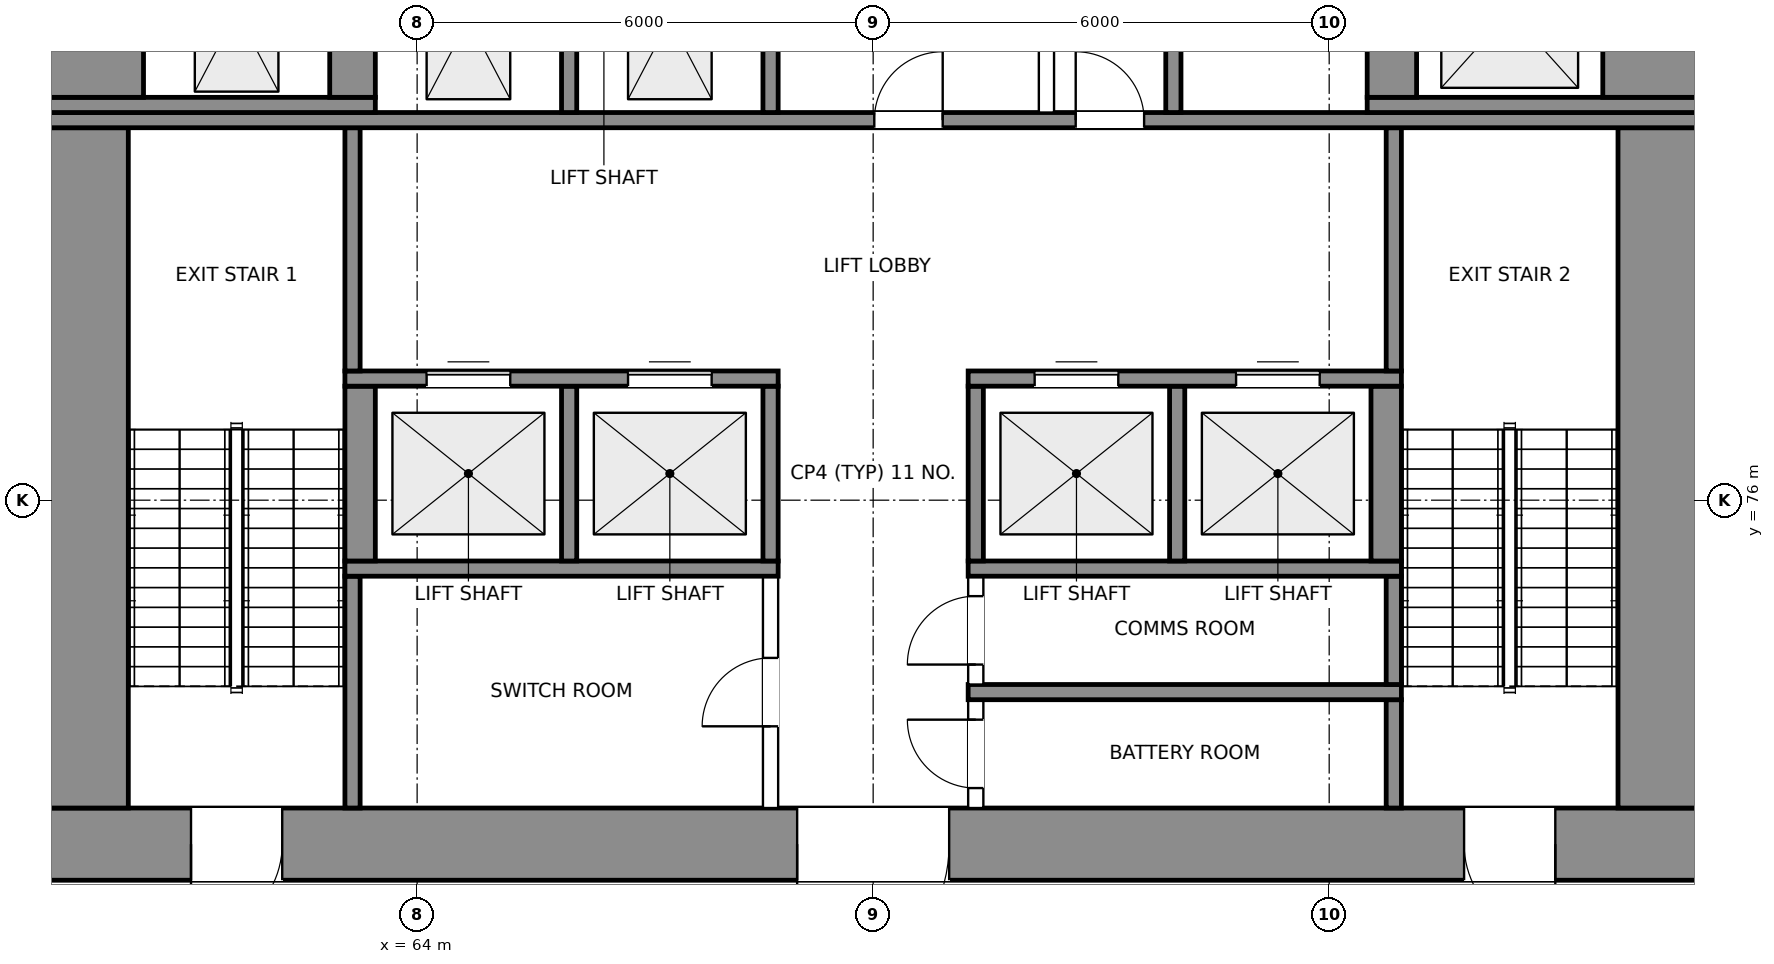
"""IFC4 building model, lengths in metres.
Left out: names, types, materials, properties, quantities, classifications, styles, units other than length and angle.
Written with IfcOpenShell. Run it as: python <this file> out.ifc"""

import sys

from ifc_helpers import new_model, si_unit, direction, frame, frame_2d, origin, place, context, subcontext, project, spatial, rectangle, extrude, element, fill, save


model = new_model("IFC4")
c1 = context("Model", 3, precision=1e-05, world=origin(), true_north=direction((0.0, 1.0)))
c2 = subcontext(c1, "Body", "Model", "MODEL_VIEW")
j1 = project(units=[si_unit("LENGTHUNIT", "METRE"), si_unit("PLANEANGLEUNIT", "RADIAN")], contexts=[c1])
p1 = place(None, origin())
s1 = spatial("IfcSite", under=j1, at=p1, CompositionType="ELEMENT")
p2 = place(p1, origin())
s2 = spatial("IfcBuilding", under=s1, at=p2, CompositionType="ELEMENT")
p3 = place(p2, frame((0.0, 0.0, 191.5)))
s3 = spatial("IfcBuildingStorey", under=s2, at=p3, CompositionType="ELEMENT", Elevation=191.5)
p4 = place(p3, frame((59.0, 71.475, 0.0), z_axis=(0.0, 0.0, 1.0), x_axis=(1.0, 0.0, 0.0)))
e1 = element("IfcWall", 1, at=p4, inside=s3, PredefinedType="SHEAR", context=c2, shape_type="SweptSolid", body=[
    extrude(rectangle(XDim=22.0, YDim=0.95, at=frame_2d((11.0, 0.0))), origin(), (0.0, 0.0, 1.0), 5.0),
])
p5 = place(p4, frame((2.025, 0.0, 0.0)))
e2 = element("IfcOpeningElement", 2, at=p5, cuts=e1, PredefinedType="OPENING", context=c2, shape_type="SweptSolid", body=[
    extrude(rectangle(XDim=1.2, YDim=2.1, at=frame_2d((0.6, 1.05))), frame((0.0, 0.485, 0.0), z_axis=(0.0, -1.0, 0.0), x_axis=(1.0, 0.0, 0.0)), (0.0, 0.0, 1.0), 0.97),
])
p6 = place(p4, frame((18.775, 0.0, 0.0)))
e3 = element("IfcOpeningElement", 3, at=p6, cuts=e1, PredefinedType="OPENING", context=c2, shape_type="SweptSolid", body=[
    extrude(rectangle(XDim=1.2, YDim=2.1, at=frame_2d((0.6, 1.05))), frame((0.0, 0.485, 0.0), z_axis=(0.0, -1.0, 0.0), x_axis=(1.0, 0.0, 0.0)), (0.0, 0.0, 1.0), 0.97),
])
p7 = place(p4, frame((10.0, 0.0, 0.0)))
e4 = element("IfcOpeningElement", 4, at=p7, cuts=e1, PredefinedType="OPENING", context=c2, shape_type="SweptSolid", body=[
    extrude(rectangle(XDim=2.0, YDim=2.1, at=frame_2d((1.0, 1.05))), frame((0.0, 0.485, 0.0), z_axis=(0.0, -1.0, 0.0), x_axis=(1.0, 0.0, 0.0)), (0.0, 0.0, 1.0), 0.97),
])
p8 = place(p3, frame((59.6, 71.95, 0.0), z_axis=(0.0, 0.0, 1.0), x_axis=(0.0, 1.0, 0.0)))
e5 = element("IfcWall", 5, at=p8, inside=s3, PredefinedType="SHEAR", context=c2, shape_type="SweptSolid", body=[
    extrude(rectangle(XDim=8.95, YDim=1.2, at=frame_2d((4.475, 0.0))), origin(), (0.0, 0.0, 1.0), 5.0),
])
p9 = place(p3, frame((63.15, 71.95, 0.0), z_axis=(0.0, 0.0, 1.0), x_axis=(0.0, 1.0, 0.0)))
e6 = element("IfcWall", 6, at=p9, inside=s3, PredefinedType="SHEAR", context=c2, shape_type="SweptSolid", body=[
    extrude(rectangle(XDim=3.05, YDim=0.2, at=frame_2d((1.525, 0.0))), origin(), (0.0, 0.0, 1.0), 5.0),
])
p10 = place(p3, frame((68.65, 71.95, 0.0), z_axis=(0.0, 0.0, 1.0), x_axis=(0.0, 1.0, 0.0)))
e7 = element("IfcWall", 7, at=p10, inside=s3, PredefinedType="PARTITIONING", context=c2, shape_type="SweptSolid", body=[
    extrude(rectangle(XDim=3.05, YDim=0.2, at=frame_2d((1.525, 0.0))), origin(), (0.0, 0.0, 1.0), 4.7),
])
p11 = place(p10, frame((1.075, 0.0, 0.0)))
e8 = element("IfcOpeningElement", 8, at=p11, cuts=e7, PredefinedType="OPENING", context=c2, shape_type="SweptSolid", body=[
    extrude(rectangle(XDim=0.9, YDim=2.1, at=frame_2d((0.45, 1.05))), frame((0.0, 0.11, 0.0), z_axis=(0.0, -1.0, 0.0), x_axis=(1.0, 0.0, 0.0)), (0.0, 0.0, 1.0), 0.22),
])
p12 = place(p3, frame((71.35, 71.95, 0.0), z_axis=(0.0, 0.0, 1.0), x_axis=(0.0, 1.0, 0.0)))
e9 = element("IfcWall", 9, at=p12, inside=s3, PredefinedType="PARTITIONING", context=c2, shape_type="SweptSolid", body=[
    extrude(rectangle(XDim=1.425, YDim=0.2, at=frame_2d((0.712, 0.0))), origin(), (0.0, 0.0, 1.0), 4.7),
])
p13 = place(p12, frame((0.262, 0.0, 0.0)))
e10 = element("IfcOpeningElement", 10, at=p13, cuts=e9, PredefinedType="OPENING", context=c2, shape_type="SweptSolid", body=[
    extrude(rectangle(XDim=0.9, YDim=2.1, at=frame_2d((0.45, 1.05))), frame((0.0, 0.11, 0.0), z_axis=(0.0, -1.0, 0.0), x_axis=(1.0, 0.0, 0.0)), (0.0, 0.0, 1.0), 0.22),
])
p14 = place(p3, frame((76.85, 71.95, 0.0), z_axis=(0.0, 0.0, 1.0), x_axis=(0.0, 1.0, 0.0)))
e11 = element("IfcWall", 11, at=p14, inside=s3, PredefinedType="SHEAR", context=c2, shape_type="SweptSolid", body=[
    extrude(rectangle(XDim=1.425, YDim=0.2, at=frame_2d((0.712, 0.0))), origin(), (0.0, 0.0, 1.0), 5.0),
])
p15 = place(p3, frame((80.4, 71.95, 0.0), z_axis=(0.0, 0.0, 1.0), x_axis=(0.0, 1.0, 0.0)))
e12 = element("IfcWall", 12, at=p15, inside=s3, PredefinedType="SHEAR", context=c2, shape_type="SweptSolid", body=[
    extrude(rectangle(XDim=8.95, YDim=1.2, at=frame_2d((4.475, 0.0))), origin(), (0.0, 0.0, 1.0), 5.0),
])
p16 = place(p3, frame((71.25, 73.475, 0.0), z_axis=(0.0, 0.0, 1.0), x_axis=(1.0, 0.0, 0.0)))
e13 = element("IfcWall", 13, at=p16, inside=s3, PredefinedType="SHEAR", context=c2, shape_type="SweptSolid", body=[
    extrude(rectangle(XDim=5.7, YDim=0.2, at=frame_2d((2.85, 0.0))), origin(), (0.0, 0.0, 1.0), 5.0),
])
p17 = place(p3, frame((71.35, 73.575, 0.0), z_axis=(0.0, 0.0, 1.0), x_axis=(0.0, 1.0, 0.0)))
e14 = element("IfcWall", 14, at=p17, inside=s3, PredefinedType="PARTITIONING", context=c2, shape_type="SweptSolid", body=[
    extrude(rectangle(XDim=1.425, YDim=0.2, at=frame_2d((0.712, 0.0))), origin(), (0.0, 0.0, 1.0), 4.7),
])
p18 = place(p17, frame((0.262, 0.0, 0.0)))
e15 = element("IfcOpeningElement", 15, at=p18, cuts=e14, PredefinedType="OPENING", context=c2, shape_type="SweptSolid", body=[
    extrude(rectangle(XDim=0.9, YDim=2.1, at=frame_2d((0.45, 1.05))), frame((0.0, 0.11, 0.0), z_axis=(0.0, -1.0, 0.0), x_axis=(1.0, 0.0, 0.0)), (0.0, 0.0, 1.0), 0.22),
])
p19 = place(p3, frame((76.85, 73.575, 0.0), z_axis=(0.0, 0.0, 1.0), x_axis=(0.0, 1.0, 0.0)))
e16 = element("IfcWall", 16, at=p19, inside=s3, PredefinedType="SHEAR", context=c2, shape_type="SweptSolid", body=[
    extrude(rectangle(XDim=1.425, YDim=0.2, at=frame_2d((0.712, 0.0))), origin(), (0.0, 0.0, 1.0), 5.0),
])
for number, where, z_axis, x_axis in (
    (17, (63.05, 75.1, 0.0), (0.0, 0.0, 1.0), (1.0, 0.0, 0.0)),
    (18, (71.25, 75.1, 0.0), (0.0, 0.0, 1.0), (1.0, 0.0, 0.0)),
):
    element("IfcWall", number, at=place(p3, frame(where, z_axis=z_axis, x_axis=x_axis)), inside=s3, PredefinedType="SHEAR", context=c2, shape_type="SweptSolid", body=[
        extrude(rectangle(XDim=5.7, YDim=0.2, at=frame_2d((2.85, 0.0))), origin(), (0.0, 0.0, 1.0), 5.0),
    ])
p20 = place(p3, frame((63.25, 75.2, 0.0), z_axis=(0.0, 0.0, 1.0), x_axis=(0.0, 1.0, 0.0)))
e19 = element("IfcWall", 19, at=p20, inside=s3, PredefinedType="SHEAR", context=c2, shape_type="SweptSolid", body=[
    extrude(rectangle(XDim=2.3, YDim=0.4, at=frame_2d((1.15, 0.0))), origin(), (0.0, 0.0, 1.0), 5.0),
])
for number, where, z_axis, x_axis in (
    (20, (66.0, 75.2, 0.0), (0.0, 0.0, 1.0), (0.0, 1.0, 0.0)),
    (21, (68.65, 75.2, 0.0), (0.0, 0.0, 1.0), (0.0, 1.0, 0.0)),
    (22, (71.35, 75.2, 0.0), (0.0, 0.0, 1.0), (0.0, 1.0, 0.0)),
    (23, (74.0, 75.2, 0.0), (0.0, 0.0, 1.0), (0.0, 1.0, 0.0)),
):
    element("IfcWall", number, at=place(p3, frame(where, z_axis=z_axis, x_axis=x_axis)), inside=s3, PredefinedType="SHEAR", context=c2, shape_type="SweptSolid", body=[
        extrude(rectangle(XDim=2.3, YDim=0.2, at=frame_2d((1.15, 0.0))), origin(), (0.0, 0.0, 1.0), 5.0),
    ])
p21 = place(p3, frame((76.75, 75.2, 0.0), z_axis=(0.0, 0.0, 1.0), x_axis=(0.0, 1.0, 0.0)))
e24 = element("IfcWall", 24, at=p21, inside=s3, PredefinedType="SHEAR", context=c2, shape_type="SweptSolid", body=[
    extrude(rectangle(XDim=2.3, YDim=0.4, at=frame_2d((1.15, 0.0))), origin(), (0.0, 0.0, 1.0), 5.0),
])
p22 = place(p3, frame((63.05, 77.6, 0.0), z_axis=(0.0, 0.0, 1.0), x_axis=(1.0, 0.0, 0.0)))
e25 = element("IfcWall", 25, at=p22, inside=s3, PredefinedType="SHEAR", context=c2, shape_type="SweptSolid", body=[
    extrude(rectangle(XDim=5.7, YDim=0.2, at=frame_2d((2.85, 0.0))), origin(), (0.0, 0.0, 1.0), 5.0),
])
p23 = place(p22, frame((1.075, 0.0, 0.0)))
e26 = element("IfcOpeningElement", 26, at=p23, cuts=e25, PredefinedType="OPENING", context=c2, shape_type="SweptSolid", body=[
    extrude(rectangle(XDim=1.1, YDim=2.1, at=frame_2d((0.55, 1.05))), frame((0.0, 0.11, 0.0), z_axis=(0.0, -1.0, 0.0), x_axis=(1.0, 0.0, 0.0)), (0.0, 0.0, 1.0), 0.22),
])
p24 = place(p22, frame((3.725, 0.0, 0.0)))
e27 = element("IfcOpeningElement", 27, at=p24, cuts=e25, PredefinedType="OPENING", context=c2, shape_type="SweptSolid", body=[
    extrude(rectangle(XDim=1.1, YDim=2.1, at=frame_2d((0.55, 1.05))), frame((0.0, 0.11, 0.0), z_axis=(0.0, -1.0, 0.0), x_axis=(1.0, 0.0, 0.0)), (0.0, 0.0, 1.0), 0.22),
])
p25 = place(p3, frame((71.25, 77.6, 0.0), z_axis=(0.0, 0.0, 1.0), x_axis=(1.0, 0.0, 0.0)))
e28 = element("IfcWall", 28, at=p25, inside=s3, PredefinedType="SHEAR", context=c2, shape_type="SweptSolid", body=[
    extrude(rectangle(XDim=5.7, YDim=0.2, at=frame_2d((2.85, 0.0))), origin(), (0.0, 0.0, 1.0), 5.0),
])
p26 = place(p25, frame((0.875, 0.0, 0.0)))
e29 = element("IfcOpeningElement", 29, at=p26, cuts=e28, PredefinedType="OPENING", context=c2, shape_type="SweptSolid", body=[
    extrude(rectangle(XDim=1.1, YDim=2.1, at=frame_2d((0.55, 1.05))), frame((0.0, 0.11, 0.0), z_axis=(0.0, -1.0, 0.0), x_axis=(1.0, 0.0, 0.0)), (0.0, 0.0, 1.0), 0.22),
])
p27 = place(p25, frame((3.525, 0.0, 0.0)))
e30 = element("IfcOpeningElement", 30, at=p27, cuts=e28, PredefinedType="OPENING", context=c2, shape_type="SweptSolid", body=[
    extrude(rectangle(XDim=1.1, YDim=2.1, at=frame_2d((0.55, 1.05))), frame((0.0, 0.11, 0.0), z_axis=(0.0, -1.0, 0.0), x_axis=(1.0, 0.0, 0.0)), (0.0, 0.0, 1.0), 0.22),
])
for number, where, z_axis, x_axis in (
    (31, (63.15, 77.7, 0.0), (0.0, 0.0, 1.0), (0.0, 1.0, 0.0)),
    (32, (76.85, 77.7, 0.0), (0.0, 0.0, 1.0), (0.0, 1.0, 0.0)),
):
    element("IfcWall", number, at=place(p3, frame(where, z_axis=z_axis, x_axis=x_axis)), inside=s3, PredefinedType="SHEAR", context=c2, shape_type="SweptSolid", body=[
        extrude(rectangle(XDim=3.2, YDim=0.2, at=frame_2d((1.6, 0.0))), origin(), (0.0, 0.0, 1.0), 5.0),
    ])
p28 = place(p3, frame((59.0, 81.0, 0.0), z_axis=(0.0, 0.0, 1.0), x_axis=(1.0, 0.0, 0.0)))
e33 = element("IfcWall", 33, at=p28, inside=s3, PredefinedType="SHEAR", context=c2, shape_type="SweptSolid", body=[
    extrude(rectangle(XDim=22.0, YDim=0.2, at=frame_2d((11.0, 0.0))), origin(), (0.0, 0.0, 1.0), 5.0),
])
p29 = place(p28, frame((11.015, 0.0, 0.0)))
e34 = element("IfcOpeningElement", 34, at=p29, cuts=e33, PredefinedType="OPENING", context=c2, shape_type="SweptSolid", body=[
    extrude(rectangle(XDim=0.9, YDim=2.1, at=frame_2d((0.45, 1.05))), frame((0.0, 0.11, 0.0), z_axis=(0.0, -1.0, 0.0), x_axis=(1.0, 0.0, 0.0)), (0.0, 0.0, 1.0), 0.22),
])
p30 = place(p28, frame((13.665, 0.0, 0.0)))
e35 = element("IfcOpeningElement", 35, at=p30, cuts=e33, PredefinedType="OPENING", context=c2, shape_type="SweptSolid", body=[
    extrude(rectangle(XDim=0.9, YDim=2.1, at=frame_2d((0.45, 1.05))), frame((0.0, 0.11, 0.0), z_axis=(0.0, -1.0, 0.0), x_axis=(1.0, 0.0, 0.0)), (0.0, 0.0, 1.0), 0.22),
])
p31 = place(p3, frame((59.0, 81.2, 0.0), z_axis=(0.0, 0.0, 1.0), x_axis=(1.0, 0.0, 0.0)))
e36 = element("IfcWall", 36, at=p31, inside=s3, PredefinedType="SHEAR", context=c2, shape_type="SweptSolid", body=[
    extrude(rectangle(XDim=4.45, YDim=0.2, at=frame_2d((2.225, 0.0))), origin(), (0.0, 0.0, 1.0), 5.0),
])
for number, where, z_axis, x_axis in (
    (37, (66.0, 81.1, 0.0), (0.0, 0.0, 1.0), (0.0, 1.0, 0.0)),
    (38, (68.65, 81.1, 0.0), (0.0, 0.0, 1.0), (0.0, 1.0, 0.0)),
):
    element("IfcWall", number, at=place(p3, frame(where, z_axis=z_axis, x_axis=x_axis)), inside=s3, PredefinedType="SHEAR", context=c2, shape_type="SweptSolid", body=[
        extrude(rectangle(XDim=2.45, YDim=0.2, at=frame_2d((1.225, 0.0))), origin(), (0.0, 0.0, 1.0), 5.0),
    ])
p32 = place(p3, frame((72.28, 81.1, 0.0), z_axis=(0.0, 0.0, 1.0), x_axis=(0.0, 1.0, 0.0)))
e39 = element("IfcWall", 39, at=p32, inside=s3, PredefinedType="PARTITIONING", context=c2, shape_type="SweptSolid", body=[
    extrude(rectangle(XDim=2.45, YDim=0.2, at=frame_2d((1.225, 0.0))), origin(), (0.0, 0.0, 1.0), 4.7),
])
p33 = place(p3, frame((73.95, 81.1, 0.0), z_axis=(0.0, 0.0, 1.0), x_axis=(0.0, 1.0, 0.0)))
e40 = element("IfcWall", 40, at=p33, inside=s3, PredefinedType="SHEAR", context=c2, shape_type="SweptSolid", body=[
    extrude(rectangle(XDim=2.45, YDim=0.2, at=frame_2d((1.225, 0.0))), origin(), (0.0, 0.0, 1.0), 5.0),
])
p34 = place(p3, frame((76.5, 81.2, 0.0), z_axis=(0.0, 0.0, 1.0), x_axis=(1.0, 0.0, 0.0)))
e41 = element("IfcWall", 41, at=p34, inside=s3, PredefinedType="SHEAR", context=c2, shape_type="SweptSolid", body=[
    extrude(rectangle(XDim=4.5, YDim=0.2, at=frame_2d((2.25, 0.0))), origin(), (0.0, 0.0, 1.0), 5.0),
])
p35 = place(p3, frame((59.7, 81.3, 0.0), z_axis=(0.0, 0.0, 1.0), x_axis=(0.0, 1.0, 0.0)))
e42 = element("IfcWall", 42, at=p35, inside=s3, PredefinedType="SHEAR", context=c2, shape_type="SweptSolid", body=[
    extrude(rectangle(XDim=2.25, YDim=1.4, at=frame_2d((1.125, 0.0))), origin(), (0.0, 0.0, 1.0), 5.0),
])
p36 = place(p3, frame((63.15, 81.3, 0.0), z_axis=(0.0, 0.0, 1.0), x_axis=(0.0, 1.0, 0.0)))
e43 = element("IfcWall", 43, at=p36, inside=s3, PredefinedType="SHEAR", context=c2, shape_type="SweptSolid", body=[
    extrude(rectangle(XDim=2.25, YDim=0.6, at=frame_2d((1.125, 0.0))), origin(), (0.0, 0.0, 1.0), 5.0),
])
p37 = place(p3, frame((76.825, 81.3, 0.0), z_axis=(0.0, 0.0, 1.0), x_axis=(0.0, 1.0, 0.0)))
e44 = element("IfcWall", 44, at=p37, inside=s3, PredefinedType="SHEAR", context=c2, shape_type="SweptSolid", body=[
    extrude(rectangle(XDim=2.25, YDim=0.65, at=frame_2d((1.125, 0.0))), origin(), (0.0, 0.0, 1.0), 5.0),
])
p38 = place(p3, frame((80.3, 81.3, 0.0), z_axis=(0.0, 0.0, 1.0), x_axis=(0.0, 1.0, 0.0)))
e45 = element("IfcWall", 45, at=p38, inside=s3, PredefinedType="SHEAR", context=c2, shape_type="SweptSolid", body=[
    extrude(rectangle(XDim=2.25, YDim=1.4, at=frame_2d((1.125, 0.0))), origin(), (0.0, 0.0, 1.0), 5.0),
])
p39 = place(p5, frame((1.2, 0.0, 0.0), z_axis=(0.0, 0.0, 1.0), x_axis=(-1.0, 0.0, 0.0)))
e46 = element("IfcDoor", 46, at=p39, inside=s3, OperationType="SINGLE_SWING_RIGHT", PredefinedType="DOOR", context=c2, shape_type="SweptSolid", body=[
    extrude(rectangle(XDim=1.2, YDim=2.1, at=frame_2d((0.6, 1.05))), frame((0.0, 0.025, 0.0), z_axis=(0.0, -1.0, 0.0), x_axis=(1.0, 0.0, 0.0)), (0.0, 0.0, 1.0), 0.05),
])
fill(e2, e46)
p40 = place(p6, frame((1.2, 0.0, 0.0), z_axis=(0.0, 0.0, 1.0), x_axis=(-1.0, 0.0, 0.0)))
e47 = element("IfcDoor", 47, at=p40, inside=s3, OperationType="SINGLE_SWING_LEFT", PredefinedType="DOOR", context=c2, shape_type="SweptSolid", body=[
    extrude(rectangle(XDim=1.2, YDim=2.1, at=frame_2d((0.6, 1.05))), frame((0.0, 0.025, 0.0), z_axis=(0.0, -1.0, 0.0), x_axis=(1.0, 0.0, 0.0)), (0.0, 0.0, 1.0), 0.05),
])
fill(e3, e47)
p41 = place(p7, frame((2.0, 0.0, 0.0), z_axis=(0.0, 0.0, 1.0), x_axis=(-1.0, 0.0, 0.0)))
e48 = element("IfcDoor", 48, at=p41, inside=s3, OperationType="DOUBLE_DOOR_SINGLE_SWING", PredefinedType="DOOR", context=c2, shape_type="SweptSolid", body=[
    extrude(rectangle(XDim=2.0, YDim=2.1, at=frame_2d((1.0, 1.05))), frame((0.0, 0.025, 0.0), z_axis=(0.0, -1.0, 0.0), x_axis=(1.0, 0.0, 0.0)), (0.0, 0.0, 1.0), 0.05),
])
fill(e4, e48)
p42 = place(p11, origin())
e49 = element("IfcDoor", 49, at=p42, inside=s3, OperationType="SINGLE_SWING_LEFT", PredefinedType="DOOR", context=c2, shape_type="SweptSolid", body=[
    extrude(rectangle(XDim=0.9, YDim=2.1, at=frame_2d((0.45, 1.05))), frame((0.0, 0.025, 0.0), z_axis=(0.0, -1.0, 0.0), x_axis=(1.0, 0.0, 0.0)), (0.0, 0.0, 1.0), 0.05),
])
fill(e8, e49)
p43 = place(p13, origin())
e50 = element("IfcDoor", 50, at=p43, inside=s3, OperationType="SINGLE_SWING_RIGHT", PredefinedType="DOOR", context=c2, shape_type="SweptSolid", body=[
    extrude(rectangle(XDim=0.9, YDim=2.1, at=frame_2d((0.45, 1.05))), frame((0.0, 0.025, 0.0), z_axis=(0.0, -1.0, 0.0), x_axis=(1.0, 0.0, 0.0)), (0.0, 0.0, 1.0), 0.05),
])
fill(e10, e50)
p44 = place(p18, origin())
e51 = element("IfcDoor", 51, at=p44, inside=s3, OperationType="SINGLE_SWING_LEFT", PredefinedType="DOOR", context=c2, shape_type="SweptSolid", body=[
    extrude(rectangle(XDim=0.9, YDim=2.1, at=frame_2d((0.45, 1.05))), frame((0.0, 0.025, 0.0), z_axis=(0.0, -1.0, 0.0), x_axis=(1.0, 0.0, 0.0)), (0.0, 0.0, 1.0), 0.05),
])
fill(e15, e51)
p45 = place(p23, origin())
e52 = element("IfcDoor", 52, at=p45, inside=s3, OperationType="DOUBLE_DOOR_SLIDING", PredefinedType="DOOR", context=c2, shape_type="SweptSolid", body=[
    extrude(rectangle(XDim=1.1, YDim=2.1, at=frame_2d((0.55, 1.05))), frame((0.0, 0.025, 0.0), z_axis=(0.0, -1.0, 0.0), x_axis=(1.0, 0.0, 0.0)), (0.0, 0.0, 1.0), 0.05),
])
fill(e26, e52)
p46 = place(p24, origin())
e53 = element("IfcDoor", 53, at=p46, inside=s3, OperationType="DOUBLE_DOOR_SLIDING", PredefinedType="DOOR", context=c2, shape_type="SweptSolid", body=[
    extrude(rectangle(XDim=1.1, YDim=2.1, at=frame_2d((0.55, 1.05))), frame((0.0, 0.025, 0.0), z_axis=(0.0, -1.0, 0.0), x_axis=(1.0, 0.0, 0.0)), (0.0, 0.0, 1.0), 0.05),
])
fill(e27, e53)
p47 = place(p26, origin())
e54 = element("IfcDoor", 54, at=p47, inside=s3, OperationType="DOUBLE_DOOR_SLIDING", PredefinedType="DOOR", context=c2, shape_type="SweptSolid", body=[
    extrude(rectangle(XDim=1.1, YDim=2.1, at=frame_2d((0.55, 1.05))), frame((0.0, 0.025, 0.0), z_axis=(0.0, -1.0, 0.0), x_axis=(1.0, 0.0, 0.0)), (0.0, 0.0, 1.0), 0.05),
])
fill(e29, e54)
p48 = place(p27, origin())
e55 = element("IfcDoor", 55, at=p48, inside=s3, OperationType="DOUBLE_DOOR_SLIDING", PredefinedType="DOOR", context=c2, shape_type="SweptSolid", body=[
    extrude(rectangle(XDim=1.1, YDim=2.1, at=frame_2d((0.55, 1.05))), frame((0.0, 0.025, 0.0), z_axis=(0.0, -1.0, 0.0), x_axis=(1.0, 0.0, 0.0)), (0.0, 0.0, 1.0), 0.05),
])
fill(e30, e55)
p49 = place(p29, origin())
e56 = element("IfcDoor", 56, at=p49, inside=s3, OperationType="SINGLE_SWING_RIGHT", PredefinedType="DOOR", context=c2, shape_type="SweptSolid", body=[
    extrude(rectangle(XDim=0.9, YDim=2.1, at=frame_2d((0.45, 1.05))), frame((0.0, 0.025, 0.0), z_axis=(0.0, -1.0, 0.0), x_axis=(1.0, 0.0, 0.0)), (0.0, 0.0, 1.0), 0.05),
])
fill(e34, e56)
p50 = place(p30, origin())
e57 = element("IfcDoor", 57, at=p50, inside=s3, OperationType="SINGLE_SWING_LEFT", PredefinedType="DOOR", context=c2, shape_type="SweptSolid", body=[
    extrude(rectangle(XDim=0.9, YDim=2.1, at=frame_2d((0.45, 1.05))), frame((0.0, 0.025, 0.0), z_axis=(0.0, -1.0, 0.0), x_axis=(1.0, 0.0, 0.0)), (0.0, 0.0, 1.0), 0.05),
])
fill(e35, e57)
save(model, sys.argv[1])
